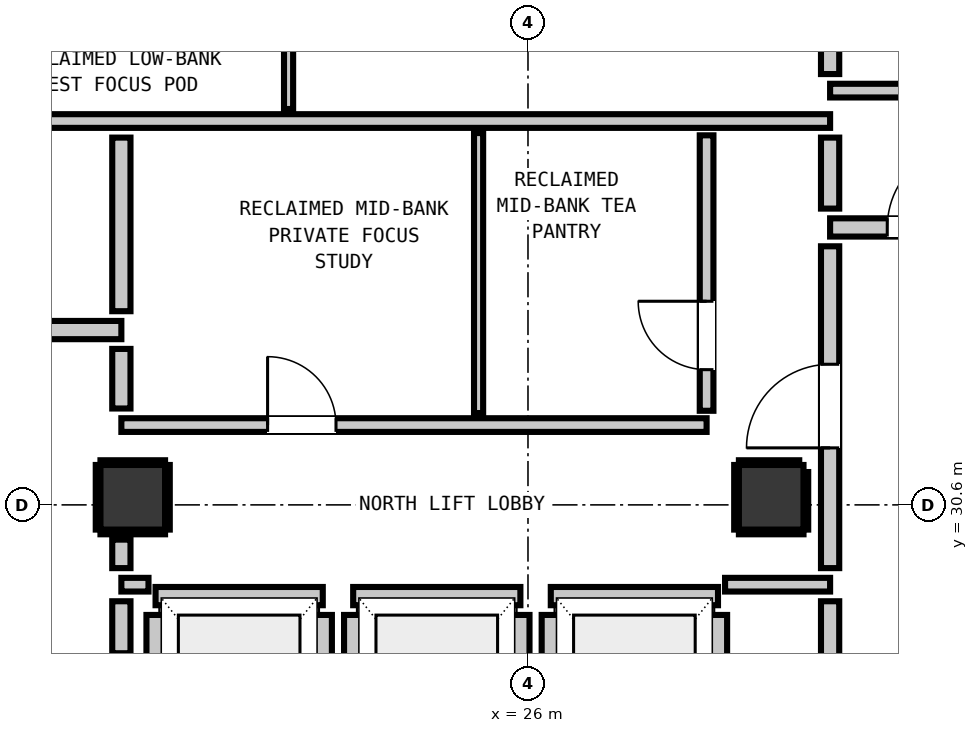
"""IFC4 building model, lengths in metres.
Left out: names, types, materials, properties, quantities, classifications, styles, units other than length and angle.
Written with IfcOpenShell. Run it as: python <this file> out.ifc"""

import sys

from ifc_helpers import new_model, si_unit, direction, frame, frame_2d, origin, origin_2d, place, context, subcontext, project, spatial, rectangle, extrude, element, fill, save


model = new_model("IFC4")
c1 = context("Model", 3, precision=1e-05, world=origin(), true_north=direction((0.0, 1.0)))
c2 = subcontext(c1, "Body", "Model", "MODEL_VIEW")
j1 = project(units=[si_unit("LENGTHUNIT", "METRE"), si_unit("PLANEANGLEUNIT", "RADIAN")], contexts=[c1])
p1 = place(None, origin())
s1 = spatial("IfcSite", under=j1, at=p1, CompositionType="ELEMENT")
p2 = place(p1, origin())
s2 = spatial("IfcBuilding", under=s1, at=p2, CompositionType="ELEMENT")
p3 = place(p2, frame((0.0, 0.0, 196.8)))
s3 = spatial("IfcBuildingStorey", under=s2, at=p3, CompositionType="ELEMENT", Elevation=196.8)
for number, where, z_axis, x_axis in (
    (1, (20.8, 30.7, 0.0), (0.0, 0.0, 1.0), (1.0, 0.0, 0.0)),
    (2, (29.2, 30.7, 0.0), (0.0, 0.0, 1.0), (1.0, 0.0, 0.0)),
):
    element("IfcColumn", number, at=place(p3, frame(where, z_axis=z_axis, x_axis=x_axis)), inside=s3, PredefinedType="COLUMN", context=c2, shape_type="SweptSolid", body=[
        extrude(rectangle(XDim=0.85, YDim=0.85, at=origin_2d()), origin(), (0.0, 0.0, 1.0), 3.32),
    ])
p4 = place(p3, frame((21.1, 29.4, 0.0), z_axis=(0.0, 0.0, 1.0), x_axis=(1.0, 0.0, 0.0)))
e3 = element("IfcWall", 3, at=p4, inside=s3, PredefinedType="PARTITIONING", context=c2, shape_type="SweptSolid", body=[
    extrude(rectangle(XDim=2.2, YDim=0.24, at=frame_2d((1.1, 0.0))), origin(), (0.0, 0.0, 1.0), 3.1),
])
p5 = place(p3, frame((21.1, 27.048, 0.0), z_axis=(0.0, 0.0, 1.0), x_axis=(0.0, 1.0, 0.0)))
e4 = element("IfcWall", 4, at=p5, inside=s3, PredefinedType="PARTITIONING", context=c2, shape_type="SweptSolid", body=[
    extrude(rectangle(XDim=2.104, YDim=0.24, at=frame_2d((1.052, 0.0))), origin(), (0.0, 0.0, 1.0), 2.335),
])
p6 = place(p3, frame((23.3, 27.048, 0.0), z_axis=(0.0, 0.0, 1.0), x_axis=(0.0, 1.0, 0.0)))
e5 = element("IfcWall", 5, at=p6, inside=s3, PredefinedType="PARTITIONING", context=c2, shape_type="SweptSolid", body=[
    extrude(rectangle(XDim=2.104, YDim=0.24, at=frame_2d((1.052, 0.0))), origin(), (0.0, 0.0, 1.0), 3.1),
])
p7 = place(p3, frame((23.7, 29.4, 0.0), z_axis=(0.0, 0.0, 1.0), x_axis=(1.0, 0.0, 0.0)))
e6 = element("IfcWall", 6, at=p7, inside=s3, PredefinedType="PARTITIONING", context=c2, shape_type="SweptSolid", body=[
    extrude(rectangle(XDim=2.2, YDim=0.24, at=frame_2d((1.1, 0.0))), origin(), (0.0, 0.0, 1.0), 3.1),
])
for number, where, z_axis, x_axis in (
    (7, (23.7, 27.048, 0.0), (0.0, 0.0, 1.0), (0.0, 1.0, 0.0)),
    (8, (25.9, 27.048, 0.0), (0.0, 0.0, 1.0), (0.0, 1.0, 0.0)),
):
    element("IfcWall", number, at=place(p3, frame(where, z_axis=z_axis, x_axis=x_axis)), inside=s3, PredefinedType="PARTITIONING", context=c2, shape_type="SweptSolid", body=[
        extrude(rectangle(XDim=2.104, YDim=0.24, at=frame_2d((1.052, 0.0))), origin(), (0.0, 0.0, 1.0), 3.1),
    ])
p8 = place(p3, frame((26.3, 29.4, 0.0), z_axis=(0.0, 0.0, 1.0), x_axis=(1.0, 0.0, 0.0)))
e9 = element("IfcWall", 9, at=p8, inside=s3, PredefinedType="PARTITIONING", context=c2, shape_type="SweptSolid", body=[
    extrude(rectangle(XDim=2.2, YDim=0.24, at=frame_2d((1.1, 0.0))), origin(), (0.0, 0.0, 1.0), 3.1),
])
p9 = place(p3, frame((26.3, 27.048, 0.0), z_axis=(0.0, 0.0, 1.0), x_axis=(0.0, 1.0, 0.0)))
e10 = element("IfcWall", 10, at=p9, inside=s3, PredefinedType="PARTITIONING", context=c2, shape_type="SweptSolid", body=[
    extrude(rectangle(XDim=2.104, YDim=0.24, at=frame_2d((1.052, 0.0))), origin(), (0.0, 0.0, 1.0), 3.1),
])
p10 = place(p3, frame((28.5, 27.33, 0.0), z_axis=(0.0, 0.0, 1.0), x_axis=(0.0, 1.0, 0.0)))
e11 = element("IfcWall", 11, at=p10, inside=s3, PredefinedType="PARTITIONING", context=c2, shape_type="SweptSolid", body=[
    extrude(rectangle(XDim=1.822, YDim=0.24, at=frame_2d((0.911, 0.0))), origin(), (0.0, 0.0, 1.0), 3.1),
])
p11 = place(p3, frame((17.45, 32.9, 0.0), z_axis=(0.0, 0.0, 1.0), x_axis=(1.0, 0.0, 0.0)))
e12 = element("IfcWall", 12, at=p11, inside=s3, PredefinedType="PARTITIONING", context=c2, shape_type="SweptSolid", body=[
    extrude(rectangle(XDim=3.2, YDim=0.24, at=frame_2d((1.6, 0.0))), origin(), (0.0, 0.0, 1.0), 3.1),
])
p12 = place(p11, frame((0.159, 0.0, 0.0)))
e13 = element("IfcOpeningElement", 13, at=p12, cuts=e12, PredefinedType="OPENING", context=c2, shape_type="SweptSolid", body=[
    extrude(rectangle(XDim=1.1, YDim=2.15, at=frame_2d((0.55, 1.075))), frame((0.0, 0.13, 0.0), z_axis=(0.0, -1.0, 0.0), x_axis=(1.0, 0.0, 0.0)), (0.0, 0.0, 1.0), 0.26),
])
p13 = place(p3, frame((29.975, 34.25, 0.0), z_axis=(0.0, 0.0, 1.0), x_axis=(1.0, 0.0, 0.0)))
e14 = element("IfcWall", 14, at=p13, inside=s3, PredefinedType="PARTITIONING", context=c2, shape_type="SweptSolid", body=[
    extrude(rectangle(XDim=2.475, YDim=0.24, at=frame_2d((1.237, 0.0))), origin(), (0.0, 0.0, 1.0), 3.1),
])
p14 = place(p13, frame((0.752, 0.0, 0.0)))
e15 = element("IfcOpeningElement", 15, at=p14, cuts=e14, PredefinedType="OPENING", context=c2, shape_type="SweptSolid", body=[
    extrude(rectangle(XDim=1.1, YDim=2.15, at=frame_2d((0.55, 1.075))), frame((0.0, 0.13, 0.0), z_axis=(0.0, -1.0, 0.0), x_axis=(1.0, 0.0, 0.0)), (0.0, 0.0, 1.0), 0.26),
])
p15 = place(p3, frame((20.65, 29.55, 0.0), z_axis=(0.0, 0.0, 1.0), x_axis=(1.0, 0.0, 0.0)))
e16 = element("IfcWall", 16, at=p15, inside=s3, PredefinedType="PARTITIONING", context=c2, shape_type="SweptSolid", body=[
    extrude(rectangle(XDim=0.357, YDim=0.18, at=frame_2d((0.179, 0.0))), origin(), (0.0, 0.0, 1.0), 3.1),
])
p16 = place(p3, frame((28.593, 29.55, 0.0), z_axis=(0.0, 0.0, 1.0), x_axis=(1.0, 0.0, 0.0)))
e17 = element("IfcWall", 17, at=p16, inside=s3, PredefinedType="PARTITIONING", context=c2, shape_type="SweptSolid", body=[
    extrude(rectangle(XDim=1.382, YDim=0.18, at=frame_2d((0.691, 0.0))), origin(), (0.0, 0.0, 1.0), 3.1),
])
p17 = place(p3, frame((20.65, 31.65, 0.0), z_axis=(0.0, 0.0, 1.0), x_axis=(1.0, 0.0, 0.0)))
e18 = element("IfcWall", 18, at=p17, inside=s3, PredefinedType="PARTITIONING", context=c2, shape_type="SweptSolid", body=[
    extrude(rectangle(XDim=7.7, YDim=0.18, at=frame_2d((3.85, 0.0))), origin(), (0.0, 0.0, 1.0), 3.1),
])
p18 = place(p17, frame((1.924, 0.0, 0.0)))
e19 = element("IfcOpeningElement", 19, at=p18, cuts=e18, PredefinedType="OPENING", context=c2, shape_type="SweptSolid", body=[
    extrude(rectangle(XDim=0.9, YDim=2.1, at=frame_2d((0.45, 1.05))), frame((0.0, 0.1, 0.0), z_axis=(0.0, -1.0, 0.0), x_axis=(1.0, 0.0, 0.0)), (0.0, 0.0, 1.0), 0.2),
])
p19 = place(p3, frame((18.95, 35.65, 0.0), z_axis=(0.0, 0.0, 1.0), x_axis=(1.0, 0.0, 0.0)))
e20 = element("IfcWall", 20, at=p19, inside=s3, PredefinedType="PARTITIONING", context=c2, shape_type="SweptSolid", body=[
    extrude(rectangle(XDim=11.025, YDim=0.18, at=frame_2d((5.513, 0.0))), origin(), (0.0, 0.0, 1.0), 3.1),
])
p20 = place(p3, frame((29.975, 36.05, 0.0), z_axis=(0.0, 0.0, 1.0), x_axis=(1.0, 0.0, 0.0)))
e21 = element("IfcWall", 21, at=p20, inside=s3, PredefinedType="PARTITIONING", context=c2, shape_type="SweptSolid", body=[
    extrude(rectangle(XDim=2.505, YDim=0.18, at=frame_2d((1.252, 0.0))), origin(), (0.0, 0.0, 1.0), 3.1),
])
p21 = place(p3, frame((20.65, 28.648, 0.0), z_axis=(0.0, 0.0, 1.0), x_axis=(0.0, 1.0, 0.0)))
e22 = element("IfcWall", 22, at=p21, inside=s3, PredefinedType="PARTITIONING", context=c2, shape_type="SweptSolid", body=[
    extrude(rectangle(XDim=0.684, YDim=0.24, at=frame_2d((0.342, 0.0))), origin(), (0.0, 0.0, 1.0), 2.335),
])
p22 = place(p3, frame((20.65, 29.768, 0.0), z_axis=(0.0, 0.0, 1.0), x_axis=(0.0, 1.0, 0.0)))
e23 = element("IfcWall", 23, at=p22, inside=s3, PredefinedType="PARTITIONING", context=c2, shape_type="SweptSolid", body=[
    extrude(rectangle(XDim=0.375, YDim=0.24, at=frame_2d((0.188, 0.0))), origin(), (0.0, 0.0, 1.0), 2.335),
])
p23 = place(p3, frame((20.65, 31.868, 0.0), z_axis=(0.0, 0.0, 1.0), x_axis=(0.0, 1.0, 0.0)))
e24 = element("IfcWall", 24, at=p23, inside=s3, PredefinedType="PARTITIONING", context=c2, shape_type="SweptSolid", body=[
    extrude(rectangle(XDim=0.784, YDim=0.24, at=frame_2d((0.392, 0.0))), origin(), (0.0, 0.0, 1.0), 2.335),
])
p24 = place(p3, frame((20.65, 33.148, 0.0), z_axis=(0.0, 0.0, 1.0), x_axis=(0.0, 1.0, 0.0)))
e25 = element("IfcWall", 25, at=p24, inside=s3, PredefinedType="PARTITIONING", context=c2, shape_type="SweptSolid", body=[
    extrude(rectangle(XDim=2.284, YDim=0.24, at=frame_2d((1.142, 0.0))), origin(), (0.0, 0.0, 1.0), 2.335),
])
p25 = place(p3, frame((29.975, 25.648, 0.0), z_axis=(0.0, 0.0, 1.0), x_axis=(0.0, 1.0, 0.0)))
e26 = element("IfcWall", 26, at=p25, inside=s3, PredefinedType="PARTITIONING", context=c2, shape_type="SweptSolid", body=[
    extrude(rectangle(XDim=3.684, YDim=0.24, at=frame_2d((1.842, 0.0))), origin(), (0.0, 0.0, 1.0), 3.1),
])
p26 = place(p3, frame((29.975, 29.768, 0.0), z_axis=(0.0, 0.0, 1.0), x_axis=(0.0, 1.0, 0.0)))
e27 = element("IfcWall", 27, at=p26, inside=s3, PredefinedType="PARTITIONING", context=c2, shape_type="SweptSolid", body=[
    extrude(rectangle(XDim=4.234, YDim=0.24, at=frame_2d((2.117, 0.0))), origin(), (0.0, 0.0, 1.0), 3.1),
])
p27 = place(p26, frame((1.582, 0.0, 0.0)))
e28 = element("IfcOpeningElement", 28, at=p27, cuts=e27, PredefinedType="OPENING", context=c2, shape_type="SweptSolid", body=[
    extrude(rectangle(XDim=1.1, YDim=2.15, at=frame_2d((0.55, 1.075))), frame((0.0, 0.13, 0.0), z_axis=(0.0, -1.0, 0.0), x_axis=(1.0, 0.0, 0.0)), (0.0, 0.0, 1.0), 0.26),
])
p28 = place(p3, frame((29.975, 34.498, 0.0), z_axis=(0.0, 0.0, 1.0), x_axis=(0.0, 1.0, 0.0)))
e29 = element("IfcWall", 29, at=p28, inside=s3, PredefinedType="PARTITIONING", context=c2, shape_type="SweptSolid", body=[
    extrude(rectangle(XDim=0.934, YDim=0.24, at=frame_2d((0.467, 0.0))), origin(), (0.0, 0.0, 1.0), 3.1),
])
p29 = place(p3, frame((29.975, 36.268, 0.0), z_axis=(0.0, 0.0, 1.0), x_axis=(0.0, 1.0, 0.0)))
e30 = element("IfcWall", 30, at=p29, inside=s3, PredefinedType="PARTITIONING", context=c2, shape_type="SweptSolid", body=[
    extrude(rectangle(XDim=2.444, YDim=0.24, at=frame_2d((1.222, 0.0))), origin(), (0.0, 0.0, 1.0), 3.1),
])
p30 = place(p3, frame((28.35, 31.838, 0.0), z_axis=(0.0, 0.0, 1.0), x_axis=(0.0, 1.0, 0.0)))
e31 = element("IfcWall", 31, at=p30, inside=s3, PredefinedType="PARTITIONING", context=c2, shape_type="SweptSolid", body=[
    extrude(rectangle(XDim=3.624, YDim=0.18, at=frame_2d((1.812, 0.0))), origin(), (0.0, 0.0, 1.0), 3.1),
])
p31 = place(p30, frame((0.541, 0.0, 0.0)))
e32 = element("IfcOpeningElement", 32, at=p31, cuts=e31, PredefinedType="OPENING", context=c2, shape_type="SweptSolid", body=[
    extrude(rectangle(XDim=0.9, YDim=2.1, at=frame_2d((0.45, 1.05))), frame((0.0, 0.1, 0.0), z_axis=(0.0, -1.0, 0.0), x_axis=(1.0, 0.0, 0.0)), (0.0, 0.0, 1.0), 0.2),
])
p32 = place(p3, frame((22.85, 35.808, 0.0), z_axis=(0.0, 0.0, 1.0), x_axis=(0.0, 1.0, 0.0)))
e33 = element("IfcWall", 33, at=p32, inside=s3, PredefinedType="PARTITIONING", context=c2, shape_type="SweptSolid", body=[
    extrude(rectangle(XDim=2.964, YDim=0.12, at=frame_2d((1.482, 0.0))), origin(), (0.0, 0.0, 1.0), 3.1),
])
p33 = place(p32, frame((1.017, 0.0, 0.0)))
e34 = element("IfcOpeningElement", 34, at=p33, cuts=e33, PredefinedType="OPENING", context=c2, shape_type="SweptSolid", body=[
    extrude(rectangle(XDim=0.9, YDim=2.1, at=frame_2d((0.45, 1.05))), frame((0.0, 0.07, 0.0), z_axis=(0.0, -1.0, 0.0), x_axis=(1.0, 0.0, 0.0)), (0.0, 0.0, 1.0), 0.14),
])
p34 = place(p3, frame((25.35, 31.808, 0.0), z_axis=(0.0, 0.0, 1.0), x_axis=(0.0, 1.0, 0.0)))
e35 = element("IfcWall", 35, at=p34, inside=s3, PredefinedType="PARTITIONING", context=c2, shape_type="SweptSolid", body=[
    extrude(rectangle(XDim=3.684, YDim=0.12, at=frame_2d((1.842, 0.0))), origin(), (0.0, 0.0, 1.0), 3.1),
])
for number, where, z_axis, x_axis in (
    (36, (20.375, 30.243, 0.0), (0.0, 0.0, 1.0), (1.0, 0.0, 0.0)),
    (37, (20.375, 31.157, 0.0), (0.0, 0.0, 1.0), (1.0, 0.0, 0.0)),
    (38, (20.343, 30.275, 0.0), (0.0, 0.0, 1.0), (0.0, 1.0, 0.0)),
    (39, (21.257, 30.275, 0.0), (0.0, 0.0, 1.0), (0.0, 1.0, 0.0)),
    (40, (28.775, 30.243, 0.0), (0.0, 0.0, 1.0), (1.0, 0.0, 0.0)),
):
    element("IfcWall", number, at=place(p3, frame(where, z_axis=z_axis, x_axis=x_axis)), inside=s3, PredefinedType="PARTITIONING", context=c2, shape_type="SweptSolid", body=[
        extrude(rectangle(XDim=0.85, YDim=0.06, at=frame_2d((0.425, 0.0))), origin(), (0.0, 0.0, 1.0), 1.45),
    ])
p35 = place(p3, frame((28.775, 31.157, 0.0), z_axis=(0.0, 0.0, 1.0), x_axis=(1.0, 0.0, 0.0)))
e41 = element("IfcWall", 41, at=p35, inside=s3, PredefinedType="PARTITIONING", context=c2, shape_type="SweptSolid", body=[
    extrude(rectangle(XDim=0.794, YDim=0.06, at=frame_2d((0.397, 0.0))), origin(), (0.0, 0.0, 1.0), 1.45),
])
p36 = place(p3, frame((28.743, 30.275, 0.0), z_axis=(0.0, 0.0, 1.0), x_axis=(0.0, 1.0, 0.0)))
e42 = element("IfcWall", 42, at=p36, inside=s3, PredefinedType="PARTITIONING", context=c2, shape_type="SweptSolid", body=[
    extrude(rectangle(XDim=0.85, YDim=0.06, at=frame_2d((0.425, 0.0))), origin(), (0.0, 0.0, 1.0), 1.45),
])
p37 = place(p3, frame((29.657, 30.275, 0.0), z_axis=(0.0, 0.0, 1.0), x_axis=(0.0, 1.0, 0.0)))
e43 = element("IfcWall", 43, at=p37, inside=s3, PredefinedType="PARTITIONING", context=c2, shape_type="SweptSolid", body=[
    extrude(rectangle(XDim=0.757, YDim=0.06, at=frame_2d((0.378, 0.0))), origin(), (0.0, 0.0, 1.0), 1.45),
])
p38 = place(p27, origin())
e44 = element("IfcDoor", 44, at=p38, inside=s3, OperationType="SINGLE_SWING_LEFT", PredefinedType="DOOR", context=c2, shape_type="SweptSolid", body=[
    extrude(rectangle(XDim=1.1, YDim=2.15, at=frame_2d((0.55, 1.075))), frame((0.0, 0.025, 0.0), z_axis=(0.0, -1.0, 0.0), x_axis=(1.0, 0.0, 0.0)), (0.0, 0.0, 1.0), 0.05),
])
fill(e28, e44)
p39 = place(p14, origin())
e45 = element("IfcDoor", 45, at=p39, inside=s3, OperationType="SINGLE_SWING_RIGHT", PredefinedType="DOOR", context=c2, shape_type="SweptSolid", body=[
    extrude(rectangle(XDim=1.1, YDim=2.15, at=frame_2d((0.55, 1.075))), frame((0.0, 0.025, 0.0), z_axis=(0.0, -1.0, 0.0), x_axis=(1.0, 0.0, 0.0)), (0.0, 0.0, 1.0), 0.05),
])
fill(e15, e45)
p40 = place(p18, origin())
e46 = element("IfcDoor", 46, at=p40, inside=s3, OperationType="SINGLE_SWING_LEFT", PredefinedType="DOOR", context=c2, shape_type="SweptSolid", body=[
    extrude(rectangle(XDim=0.9, YDim=2.1, at=frame_2d((0.45, 1.05))), frame((0.0, 0.025, 0.0), z_axis=(0.0, -1.0, 0.0), x_axis=(1.0, 0.0, 0.0)), (0.0, 0.0, 1.0), 0.05),
])
fill(e19, e46)
p41 = place(p31, origin())
e47 = element("IfcDoor", 47, at=p41, inside=s3, OperationType="SINGLE_SWING_RIGHT", PredefinedType="DOOR", context=c2, shape_type="SweptSolid", body=[
    extrude(rectangle(XDim=0.9, YDim=2.1, at=frame_2d((0.45, 1.05))), frame((0.0, 0.025, 0.0), z_axis=(0.0, -1.0, 0.0), x_axis=(1.0, 0.0, 0.0)), (0.0, 0.0, 1.0), 0.05),
])
fill(e32, e47)
save(model, sys.argv[1])
